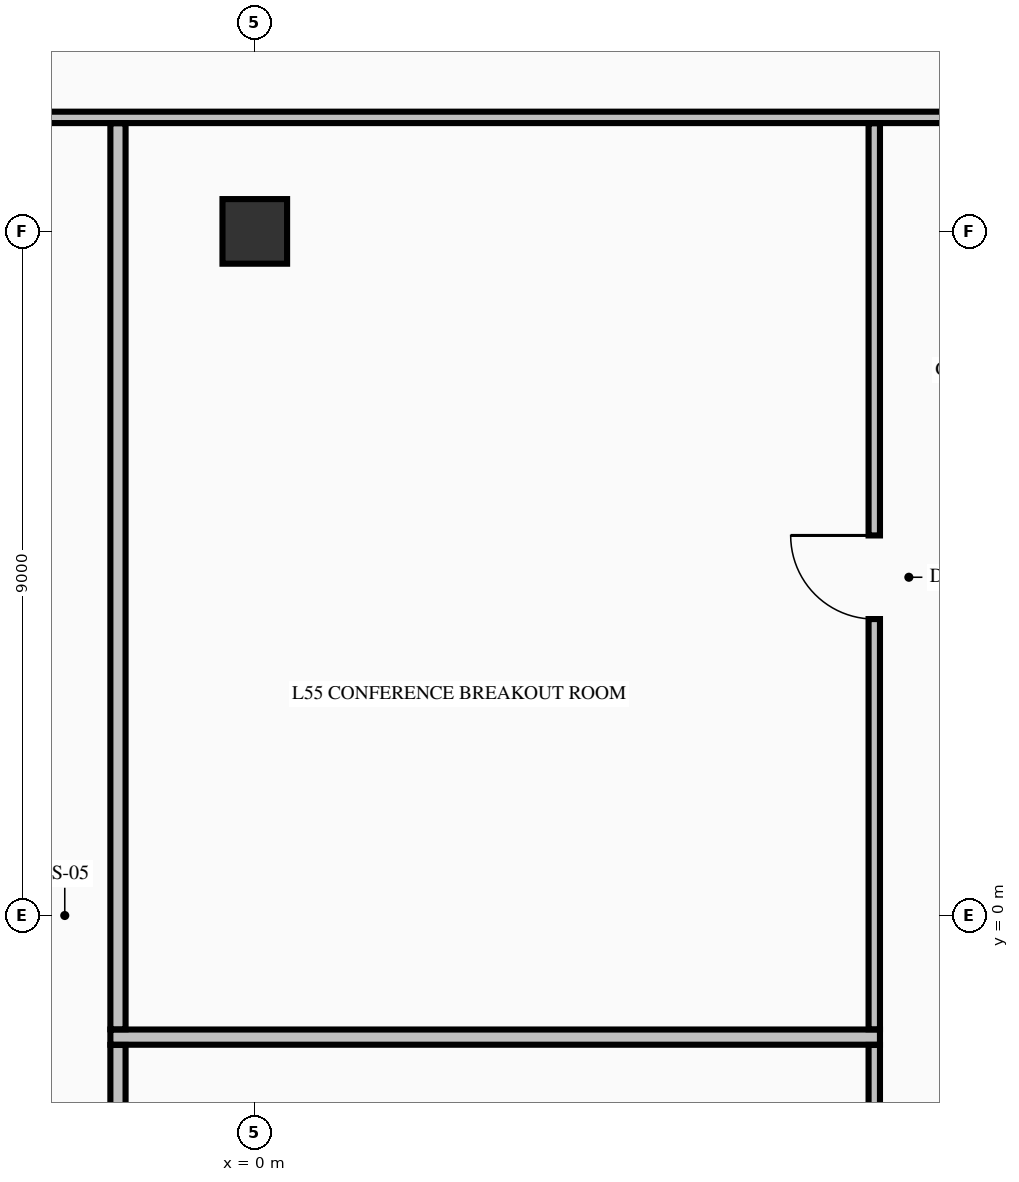
"""IFC4 building model, lengths in metres.
Left out: names, types, materials, properties, quantities, classifications, styles, units other than length and angle.
Written with IfcOpenShell. Run it as: python <this file> out.ifc"""

import sys

from ifc_helpers import new_model, si_unit, direction, frame, frame_2d, origin, origin_2d, place, context, subcontext, project, spatial, rectangle, extrude, element, fill, save


model = new_model("IFC4")
c1 = context("Model", 3, precision=1e-05, world=origin(), true_north=direction((0.0, 1.0)))
c2 = subcontext(c1, "Body", "Model", "MODEL_VIEW")
j1 = project(units=[si_unit("LENGTHUNIT", "METRE"), si_unit("PLANEANGLEUNIT", "RADIAN")], contexts=[c1])
p1 = place(None, origin())
s1 = spatial("IfcSite", under=j1, at=p1, CompositionType="ELEMENT")
p2 = place(p1, origin())
s2 = spatial("IfcBuilding", under=s1, at=p2, CompositionType="ELEMENT")
p3 = place(p2, frame((0.0, 0.0, 211.86)))
s3 = spatial("IfcBuildingStorey", under=s2, at=p3, CompositionType="ELEMENT", Elevation=211.86)
p4 = place(p3, frame((0.0, 9.0, -0.325), z_axis=(0.0, 0.0, 1.0), x_axis=(1.0, 0.0, 0.0)))
e1 = element("IfcColumn", 1, at=p4, inside=s3, PredefinedType="COLUMN", context=c2, shape_type="SweptSolid", body=[
    extrude(rectangle(XDim=0.85, YDim=0.85, at=origin_2d()), origin(), (0.0, 0.0, 1.0), 3.475),
])
p5 = place(p3, frame((-1.9, -1.6, 0.0), z_axis=(0.0, 0.0, 1.0), x_axis=(1.0, 0.0, 0.0)))
e2 = element("IfcWall", 2, at=p5, inside=s3, PredefinedType="PARTITIONING", context=c2, shape_type="SweptSolid", body=[
    extrude(rectangle(XDim=10.125, YDim=0.2, at=frame_2d((5.062, 0.0))), origin(), (0.0, 0.0, 1.0), 3.15),
])
p6 = place(p3, frame((-10.569, 10.5, 0.0), z_axis=(0.0, 0.0, 1.0), x_axis=(1.0, 0.0, 0.0)))
e3 = element("IfcWall", 3, at=p6, inside=s3, PredefinedType="PARTITIONING", context=c2, shape_type="SweptSolid", body=[
    extrude(rectangle(XDim=21.138, YDim=0.15, at=frame_2d((10.569, 0.0))), origin(), (0.0, 0.0, 1.0), 3.15),
])
p7 = place(p6, frame((0.474, 0.0, 0.0)))
e4 = element("IfcOpeningElement", 4, at=p7, cuts=e3, PredefinedType="OPENING", context=c2, shape_type="SweptSolid", body=[
    extrude(rectangle(XDim=1.05, YDim=2.15, at=frame_2d((0.525, 1.075))), frame((0.0, 0.085, 0.0), z_axis=(0.0, -1.0, 0.0), x_axis=(1.0, 0.0, 0.0)), (0.0, 0.0, 1.0), 0.17),
])
p8 = place(p6, frame((19.614, 0.0, 0.0)))
e5 = element("IfcOpeningElement", 5, at=p8, cuts=e3, PredefinedType="OPENING", context=c2, shape_type="SweptSolid", body=[
    extrude(rectangle(XDim=1.05, YDim=2.15, at=frame_2d((0.525, 1.075))), frame((0.0, 0.085, 0.0), z_axis=(0.0, -1.0, 0.0), x_axis=(1.0, 0.0, 0.0)), (0.0, 0.0, 1.0), 0.17),
])
p9 = place(p3, frame((-1.8, -2.497, 0.0), z_axis=(0.0, 0.0, 1.0), x_axis=(0.0, 1.0, 0.0)))
e6 = element("IfcWall", 6, at=p9, inside=s3, PredefinedType="PARTITIONING", context=c2, shape_type="SweptSolid", body=[
    extrude(rectangle(XDim=0.794, YDim=0.2, at=frame_2d((0.397, 0.0))), origin(), (0.0, 0.0, 1.0), 3.15),
])
p10 = place(p3, frame((-1.8, -1.497, 0.0), z_axis=(0.0, 0.0, 1.0), x_axis=(0.0, 1.0, 0.0)))
e7 = element("IfcWall", 7, at=p10, inside=s3, PredefinedType="PARTITIONING", context=c2, shape_type="SweptSolid", body=[
    extrude(rectangle(XDim=11.919, YDim=0.2, at=frame_2d((5.959, 0.0))), origin(), (0.0, 0.0, 1.0), 3.15),
])
p11 = place(p3, frame((8.15, -5.097, 0.0), z_axis=(0.0, 0.0, 1.0), x_axis=(0.0, 1.0, 0.0)))
e8 = element("IfcWall", 8, at=p11, inside=s3, PredefinedType="PARTITIONING", context=c2, shape_type="SweptSolid", body=[
    extrude(rectangle(XDim=3.394, YDim=0.15, at=frame_2d((1.697, 0.0))), origin(), (0.0, 0.0, 1.0), 3.15),
])
p12 = place(p11, frame((1.222, 0.0, 0.0)))
e9 = element("IfcOpeningElement", 9, at=p12, cuts=e8, PredefinedType="OPENING", context=c2, shape_type="SweptSolid", body=[
    extrude(rectangle(XDim=0.95, YDim=2.15, at=frame_2d((0.475, 1.075))), frame((0.0, 0.085, 0.0), z_axis=(0.0, -1.0, 0.0), x_axis=(1.0, 0.0, 0.0)), (0.0, 0.0, 1.0), 0.17),
])
p13 = place(p3, frame((8.15, -1.497, 0.0), z_axis=(0.0, 0.0, 1.0), x_axis=(0.0, 1.0, 0.0)))
e10 = element("IfcWall", 10, at=p13, inside=s3, PredefinedType="PARTITIONING", context=c2, shape_type="SweptSolid", body=[
    extrude(rectangle(XDim=11.919, YDim=0.15, at=frame_2d((5.959, 0.0))), origin(), (0.0, 0.0, 1.0), 3.15),
])
p14 = place(p13, frame((5.397, 0.0, 0.0)))
e11 = element("IfcOpeningElement", 11, at=p14, cuts=e10, PredefinedType="OPENING", context=c2, shape_type="SweptSolid", body=[
    extrude(rectangle(XDim=1.1, YDim=2.15, at=frame_2d((0.55, 1.075))), frame((0.0, 0.085, 0.0), z_axis=(0.0, -1.0, 0.0), x_axis=(1.0, 0.0, 0.0)), (0.0, 0.0, 1.0), 0.17),
])
p15 = place(p14, origin())
e12 = element("IfcDoor", 12, at=p15, inside=s3, OperationType="SINGLE_SWING_RIGHT", PredefinedType="DOOR", context=c2, shape_type="SweptSolid", body=[
    extrude(rectangle(XDim=1.1, YDim=2.15, at=frame_2d((0.55, 1.075))), frame((0.0, 0.025, 0.0), z_axis=(0.0, -1.0, 0.0), x_axis=(1.0, 0.0, 0.0)), (0.0, 0.0, 1.0), 0.05),
])
fill(e11, e12)
save(model, sys.argv[1])
